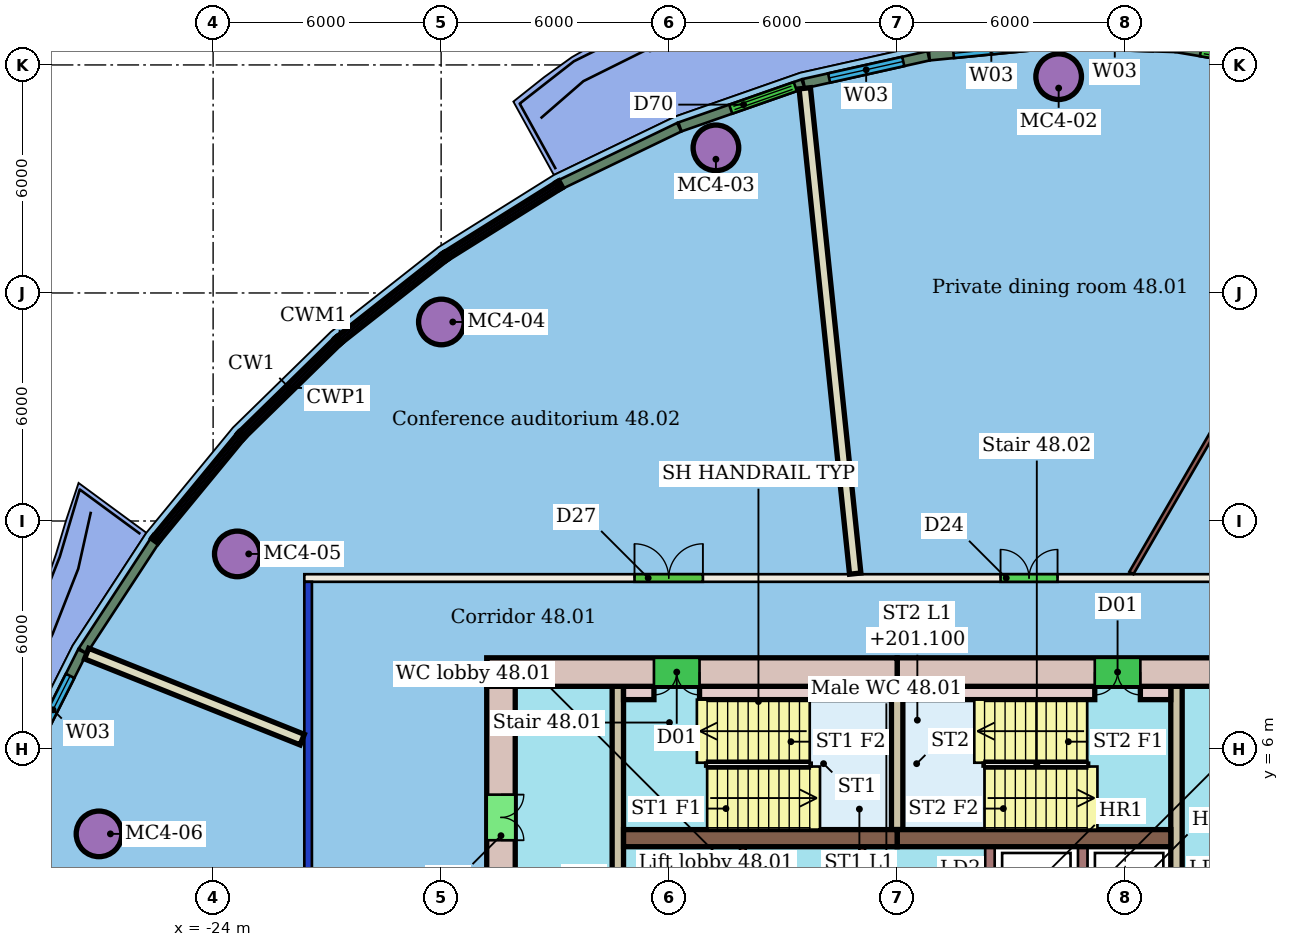
"""IFC4 building model, lengths in metres.
Left out: names, types, materials, properties, quantities, classifications, styles, units other than length and angle.
Written with IfcOpenShell. Run it as: python <this file> out.ifc"""

import sys

from ifc_helpers import new_model, si_unit, direction, frame, frame_2d, origin, origin_2d, place, context, subcontext, project, spatial, rectangle, hollow_circle, extrude, element, fill, save


model = new_model("IFC4")
c1 = context("Model", 3, precision=1e-05, world=origin(), true_north=direction((0.0, 1.0)))
c2 = subcontext(c1, "Body", "Model", "MODEL_VIEW")
j1 = project(units=[si_unit("LENGTHUNIT", "METRE"), si_unit("PLANEANGLEUNIT", "RADIAN")], contexts=[c1])
p1 = place(None, origin())
s1 = spatial("IfcSite", under=j1, at=p1, CompositionType="ELEMENT")
p2 = place(p1, origin())
s2 = spatial("IfcBuilding", under=s1, at=p2, CompositionType="ELEMENT")
p3 = place(p2, frame((0.0, 0.0, 199.3)))
s3 = spatial("IfcBuildingStorey", under=s2, at=p3, CompositionType="ELEMENT", Elevation=199.3)
for number, where, z_axis, x_axis in (
    (1, (-1.75, 23.691, 0.0), (0.0, 0.0, 1.0), (1.0, 0.0, 0.0)),
    (2, (-10.769, 21.819, 0.0), (0.0, 0.0, 1.0), (1.0, 0.0, 0.0)),
    (3, (-17.993, 17.237, 0.0), (0.0, 0.0, 1.0), (1.0, 0.0, 0.0)),
    (4, (-23.363, 11.134, 0.0), (0.0, 0.0, 1.0), (1.0, 0.0, 0.0)),
    (5, (-27.003, 3.768, 0.0), (0.0, 0.0, 1.0), (1.0, 0.0, 0.0)),
):
    element("IfcColumn", number, at=place(p3, frame(where, z_axis=z_axis, x_axis=x_axis)), inside=s3, PredefinedType="COLUMN", context=c2, shape_type="SweptSolid", body=[
        extrude(hollow_circle(Radius=0.6, WallThickness=0.045, at=origin_2d()), origin(), (0.0, 0.0, 1.0), 3.45),
    ])
p4 = place(p3, frame((-21.5, -10.4, 0.0), z_axis=(0.0, 0.0, 1.0), x_axis=(0.0, 1.0, 0.0)))
e6 = element("IfcWall", 6, at=p4, inside=s3, PredefinedType="PARTITIONING", context=c2, shape_type="SweptSolid", body=[
    extrude(rectangle(XDim=20.8, YDim=0.2, at=frame_2d((10.4, 0.0))), origin(), (0.0, 0.0, 1.0), 3.05),
])
p5 = place(p4, frame((10.705, 0.0, 0.0)))
e7 = element("IfcOpeningElement", 7, at=p5, cuts=e6, PredefinedType="OPENING", context=c2, shape_type="SweptSolid", body=[
    extrude(rectangle(XDim=1.8, YDim=2.4, at=frame_2d((0.9, 1.2))), frame((0.0, 0.11, 0.0), z_axis=(0.0, -1.0, 0.0), x_axis=(1.0, 0.0, 0.0)), (0.0, 0.0, 1.0), 0.22),
])
p6 = place(p3, frame((-21.6, 10.5, 0.0), z_axis=(0.0, 0.0, 1.0), x_axis=(1.0, 0.0, 0.0)))
e8 = element("IfcWall", 8, at=p6, inside=s3, PredefinedType="PARTITIONING", context=c2, shape_type="SweptSolid", body=[
    extrude(rectangle(XDim=31.2, YDim=0.2, at=frame_2d((15.6, 0.0))), origin(), (0.0, 0.0, 1.0), 3.45),
])
p7 = place(p6, frame((18.321, 0.0, 0.0)))
e9 = element("IfcOpeningElement", 9, at=p7, cuts=e8, PredefinedType="OPENING", context=c2, shape_type="SweptSolid", body=[
    extrude(rectangle(XDim=1.5, YDim=2.1, at=frame_2d((0.75, 1.05))), frame((0.0, 0.11, 0.0), z_axis=(0.0, -1.0, 0.0), x_axis=(1.0, 0.0, 0.0)), (0.0, 0.0, 1.0), 0.22),
])
p8 = place(p6, frame((8.688, 0.0, 0.0)))
e10 = element("IfcOpeningElement", 10, at=p8, cuts=e8, PredefinedType="OPENING", context=c2, shape_type="SweptSolid", body=[
    extrude(rectangle(XDim=1.8, YDim=2.4, at=frame_2d((0.9, 1.2))), frame((0.0, 0.11, 0.0), z_axis=(0.0, -1.0, 0.0), x_axis=(1.0, 0.0, 0.0)), (0.0, 0.0, 1.0), 0.22),
])
p9 = place(p6, frame((24.241, 0.0, 0.0)))
e11 = element("IfcOpeningElement", 11, at=p9, cuts=e8, PredefinedType="OPENING", context=c2, shape_type="SweptSolid", body=[
    extrude(rectangle(XDim=1.8, YDim=2.1, at=frame_2d((0.9, 1.05))), frame((0.0, 0.11, 0.0), z_axis=(0.0, -1.0, 0.0), x_axis=(1.0, 0.0, 0.0)), (0.0, 0.0, 1.0), 0.22),
])
p10 = place(p3, frame((7.277, 22.904, 0.0), z_axis=(0.0, 0.0, 1.0), x_axis=(-0.501519234172, -0.865146494968, 0.0)))
e12 = element("IfcWall", 12, at=p10, inside=s3, PredefinedType="PARTITIONING", context=c2, shape_type="SweptSolid", body=[
    extrude(rectangle(XDim=14.185, YDim=0.125, at=frame_2d((7.093, 0.0))), origin(), (0.0, 0.0, 1.0), 3.45),
])
p11 = place(p3, frame((-8.431, 23.386, 0.0), z_axis=(0.0, 0.0, 1.0), x_axis=(0.103405820215, -0.994639249349, 0.0)))
e13 = element("IfcWall", 13, at=p11, inside=s3, PredefinedType="PARTITIONING", context=c2, shape_type="SweptSolid", body=[
    extrude(rectangle(XDim=12.839, YDim=0.3, at=frame_2d((6.419, 0.0))), origin(), (0.0, 0.0, 1.0), 3.45),
])
p12 = place(p3, frame((-27.328, 8.511, 0.0), z_axis=(0.0, 0.0, 1.0), x_axis=(0.928768643744, -0.370659960608, 0.0)))
e14 = element("IfcWall", 14, at=p12, inside=s3, PredefinedType="PARTITIONING", context=c2, shape_type="SweptSolid", body=[
    extrude(rectangle(XDim=6.107, YDim=0.3, at=frame_2d((3.054, 0.0))), origin(), (0.0, 0.0, 1.0), 3.45),
])
p13 = place(p3, frame((4.406, 23.948, 0.0), z_axis=(0.0, 0.0, 1.0), x_axis=(-0.986216863641, 0.165457843178, 0.0)))
e15 = element("IfcWall", 15, at=p13, inside=s3, PredefinedType="SOLIDWALL", context=c2, shape_type="SweptSolid", body=[
    extrude(rectangle(XDim=3.103, YDim=0.25, at=frame_2d((1.552, 0.0))), origin(), (0.0, 0.0, 1.0), 3.1),
])
p14 = place(p13, frame((0.652, 0.0, 0.0)))
e16 = element("IfcOpeningElement", 16, at=p14, cuts=e15, PredefinedType="OPENING", context=c2, shape_type="SweptSolid", body=[
    extrude(rectangle(XDim=1.8, YDim=2.4, at=frame_2d((0.9, 1.2))), frame((0.0, 0.135, 0.0), z_axis=(0.0, -1.0, 0.0), x_axis=(1.0, 0.0, 0.0)), (0.0, 0.0, 1.0), 0.27),
])
p15 = place(p3, frame((-1.891, 24.562, 0.0), z_axis=(0.0, 0.0, 1.0), x_axis=(-0.995263213441, -0.097216953109, 0.0)))
e17 = element("IfcWall", 17, at=p15, inside=s3, PredefinedType="SOLIDWALL", context=c2, shape_type="SweptSolid", body=[
    extrude(rectangle(XDim=3.277, YDim=0.25, at=frame_2d((1.639, 0.0))), origin(), (0.0, 0.0, 1.0), 3.1),
])
p16 = place(p15, frame((0.639, 0.0, 0.9)))
e18 = element("IfcOpeningElement", 18, at=p16, cuts=e17, PredefinedType="OPENING", context=c2, shape_type="SweptSolid", body=[
    extrude(rectangle(XDim=2.0, YDim=2.1, at=frame_2d((1.0, 1.05))), frame((0.0, 0.135, 0.0), z_axis=(0.0, -1.0, 0.0), x_axis=(1.0, 0.0, 0.0)), (0.0, 0.0, 1.0), 0.27),
])
p17 = place(p3, frame((-5.176, 24.24, 0.0), z_axis=(0.0, 0.0, 1.0), x_axis=(-0.976008895139, -0.217730651514, 0.0)))
e19 = element("IfcWall", 19, at=p17, inside=s3, PredefinedType="SOLIDWALL", context=c2, shape_type="SweptSolid", body=[
    extrude(rectangle(XDim=3.359, YDim=0.25, at=frame_2d((1.68, 0.0))), origin(), (0.0, 0.0, 1.0), 3.1),
])
p18 = place(p17, frame((0.68, 0.0, 0.9)))
e20 = element("IfcOpeningElement", 20, at=p18, cuts=e19, PredefinedType="OPENING", context=c2, shape_type="SweptSolid", body=[
    extrude(rectangle(XDim=2.0, YDim=2.1, at=frame_2d((1.0, 1.05))), frame((0.0, 0.135, 0.0), z_axis=(0.0, -1.0, 0.0), x_axis=(1.0, 0.0, 0.0)), (0.0, 0.0, 1.0), 0.27),
])
p19 = place(p3, frame((-8.477, 23.502, 0.0), z_axis=(0.0, 0.0, 1.0), x_axis=(-0.943927112693, -0.330153912475, 0.0)))
e21 = element("IfcWall", 21, at=p19, inside=s3, PredefinedType="SOLIDWALL", context=c2, shape_type="SweptSolid", body=[
    extrude(rectangle(XDim=3.431, YDim=0.25, at=frame_2d((1.716, 0.0))), origin(), (0.0, 0.0, 1.0), 3.1),
])
p20 = place(p19, frame((0.216, 0.0, 0.0)))
e22 = element("IfcOpeningElement", 22, at=p20, cuts=e21, PredefinedType="OPENING", context=c2, shape_type="SweptSolid", body=[
    extrude(rectangle(XDim=1.8, YDim=2.4, at=frame_2d((0.9, 1.2))), frame((0.0, 0.135, 0.0), z_axis=(0.0, -1.0, 0.0), x_axis=(1.0, 0.0, 0.0)), (0.0, 0.0, 1.0), 0.27),
])
for number, where, z_axis, x_axis in (
    (23, (-11.736, 22.361, 0.0), (0.0, 0.0, 1.0), (-0.901, -0.434, 0.0)),
    (24, (-25.545, 11.466, 0.0), (0.0, 0.0, 1.0), (-0.547, -0.837, 0.0)),
):
    element("IfcWall", number, at=place(p3, frame(where, z_axis=z_axis, x_axis=x_axis)), inside=s3, PredefinedType="SOLIDWALL", context=c2, shape_type="SweptSolid", body=[
        extrude(rectangle(XDim=3.445, YDim=0.25, at=frame_2d((1.722, 0.0))), origin(), (0.0, 0.0, 1.0), 3.1),
    ])
p21 = place(p3, frame((-27.441, 8.564, 0.0), z_axis=(0.0, 0.0, 1.0), x_axis=(-0.449602668961, -0.89322866057, 0.0)))
e25 = element("IfcWall", 25, at=p21, inside=s3, PredefinedType="SOLIDWALL", context=c2, shape_type="SweptSolid", body=[
    extrude(rectangle(XDim=3.431, YDim=0.25, at=frame_2d((1.716, 0.0))), origin(), (0.0, 0.0, 1.0), 3.1),
])
p22 = place(p21, frame((0.716, 0.0, 0.9)))
e26 = element("IfcOpeningElement", 26, at=p22, cuts=e25, PredefinedType="OPENING", context=c2, shape_type="SweptSolid", body=[
    extrude(rectangle(XDim=2.0, YDim=2.1, at=frame_2d((1.0, 1.05))), frame((0.0, 0.135, 0.0), z_axis=(0.0, -1.0, 0.0), x_axis=(1.0, 0.0, 0.0)), (0.0, 0.0, 1.0), 0.27),
])
p23 = place(p3, frame((4.8, 8.025, 0.0), z_axis=(0.0, 0.0, 1.0), x_axis=(-1.0, 0.0, 0.0)))
e27 = element("IfcWall", 27, at=p23, inside=s3, PredefinedType="SHEAR", context=c2, shape_type="SweptSolid", body=[
    extrude(rectangle(XDim=10.8, YDim=0.75, at=frame_2d((5.4, 0.0))), origin(), (0.0, 0.0, 1.0), 3.3),
])
p24 = place(p23, frame((4.4, 0.0, 0.0)))
e28 = element("IfcOpeningElement", 28, at=p24, cuts=e27, PredefinedType="OPENING", context=c2, shape_type="SweptSolid", body=[
    extrude(rectangle(XDim=1.2, YDim=2.1, at=frame_2d((0.6, 1.05))), frame((0.0, 0.385, 0.0), z_axis=(0.0, -1.0, 0.0), x_axis=(1.0, 0.0, 0.0)), (0.0, 0.0, 1.0), 0.77),
])
p25 = place(p3, frame((-6.0, 8.025, 0.0), z_axis=(0.0, 0.0, 1.0), x_axis=(-1.0, 0.0, 0.0)))
e29 = element("IfcWall", 29, at=p25, inside=s3, PredefinedType="SHEAR", context=c2, shape_type="SweptSolid", body=[
    extrude(rectangle(XDim=10.8, YDim=0.75, at=frame_2d((5.4, 0.0))), origin(), (0.0, 0.0, 1.0), 3.3),
])
p26 = place(p25, frame((5.2, 0.0, 0.0)))
e30 = element("IfcOpeningElement", 30, at=p26, cuts=e29, PredefinedType="OPENING", context=c2, shape_type="SweptSolid", body=[
    extrude(rectangle(XDim=1.2, YDim=2.1, at=frame_2d((0.6, 1.05))), frame((0.0, 0.385, 0.0), z_axis=(0.0, -1.0, 0.0), x_axis=(1.0, 0.0, 0.0)), (0.0, 0.0, 1.0), 0.77),
])
p27 = place(p3, frame((-16.425, 7.65, 0.0), z_axis=(0.0, 0.0, 1.0), x_axis=(0.0, -1.0, 0.0)))
e31 = element("IfcWall", 31, at=p27, inside=s3, PredefinedType="SHEAR", context=c2, shape_type="SweptSolid", body=[
    extrude(rectangle(XDim=15.3, YDim=0.75, at=frame_2d((7.65, 0.0))), origin(), (0.0, 0.0, 1.0), 3.3),
])
p28 = place(p27, frame((11.25, 0.0, 0.0)))
e32 = element("IfcOpeningElement", 32, at=p28, cuts=e31, PredefinedType="OPENING", context=c2, shape_type="SweptSolid", body=[
    extrude(rectangle(XDim=1.2, YDim=2.1, at=frame_2d((0.6, 1.05))), frame((0.0, 0.385, 0.0), z_axis=(0.0, -1.0, 0.0), x_axis=(1.0, 0.0, 0.0)), (0.0, 0.0, 1.0), 0.77),
])
p29 = place(p27, frame((2.85, 0.0, 0.0)))
e33 = element("IfcOpeningElement", 33, at=p29, cuts=e31, PredefinedType="OPENING", context=c2, shape_type="SweptSolid", body=[
    extrude(rectangle(XDim=1.2, YDim=2.1, at=frame_2d((0.6, 1.05))), frame((0.0, 0.385, 0.0), z_axis=(0.0, -1.0, 0.0), x_axis=(1.0, 0.0, 0.0)), (0.0, 0.0, 1.0), 0.77),
])
for number, where, z_axis, x_axis in (
    (34, (-13.2, 3.655, 0.0), (0.0, 0.0, 1.0), (1.0, 0.0, 0.0)),
    (35, (-6.0, 3.655, 0.0), (0.0, 0.0, 1.0), (1.0, 0.0, 0.0)),
):
    element("IfcWall", number, at=place(p3, frame(where, z_axis=z_axis, x_axis=x_axis)), inside=s3, PredefinedType="SHEAR", context=c2, shape_type="SweptSolid", body=[
        extrude(rectangle(XDim=7.2, YDim=0.45, at=frame_2d((3.6, 0.0))), origin(), (0.0, 0.0, 1.0), 3.3),
    ])
p30 = place(p3, frame((-13.35, 7.65, 0.0), z_axis=(0.0, 0.0, 1.0), x_axis=(0.0, -1.0, 0.0)))
e36 = element("IfcWall", 36, at=p30, inside=s3, PredefinedType="SHEAR", context=c2, shape_type="SweptSolid", body=[
    extrude(rectangle(XDim=15.3, YDim=0.3, at=frame_2d((7.65, 0.0))), origin(), (0.0, 0.0, 1.0), 3.3),
])
p31 = place(p30, frame((6.9, 0.0, 0.0)))
e37 = element("IfcOpeningElement", 37, at=p31, cuts=e36, PredefinedType="OPENING", context=c2, shape_type="SweptSolid", body=[
    extrude(rectangle(XDim=1.5, YDim=2.1, at=frame_2d((0.75, 1.05))), frame((0.0, 0.16, 0.0), z_axis=(0.0, -1.0, 0.0), x_axis=(1.0, 0.0, 0.0)), (0.0, 0.0, 1.0), 0.32),
])
p32 = place(p3, frame((1.35, -7.65, 0.0), z_axis=(0.0, 0.0, 1.0), x_axis=(0.0, 1.0, 0.0)))
e38 = element("IfcWall", 38, at=p32, inside=s3, PredefinedType="SHEAR", context=c2, shape_type="SweptSolid", body=[
    extrude(rectangle(XDim=15.3, YDim=0.3, at=frame_2d((7.65, 0.0))), origin(), (0.0, 0.0, 1.0), 3.3),
])
p33 = place(p32, frame((1.56, 0.0, 0.0)))
e39 = element("IfcOpeningElement", 39, at=p33, cuts=e38, PredefinedType="OPENING", context=c2, shape_type="SweptSolid", body=[
    extrude(rectangle(XDim=1.0, YDim=2.1, at=frame_2d((0.5, 1.05))), frame((0.0, 0.16, 0.0), z_axis=(0.0, -1.0, 0.0), x_axis=(1.0, 0.0, 0.0)), (0.0, 0.0, 1.0), 0.32),
])
p34 = place(p32, frame((6.9, 0.0, 0.0)))
e40 = element("IfcOpeningElement", 40, at=p34, cuts=e38, PredefinedType="OPENING", context=c2, shape_type="SweptSolid", body=[
    extrude(rectangle(XDim=1.5, YDim=2.1, at=frame_2d((0.75, 1.05))), frame((0.0, 0.16, 0.0), z_axis=(0.0, -1.0, 0.0), x_axis=(1.0, 0.0, 0.0)), (0.0, 0.0, 1.0), 0.32),
])
p35 = place(p3, frame((-6.0, 3.88, 0.0), z_axis=(0.0, 0.0, 1.0), x_axis=(0.0, 1.0, 0.0)))
e41 = element("IfcWall", 41, at=p35, inside=s3, PredefinedType="SHEAR", context=c2, shape_type="SweptSolid", body=[
    extrude(rectangle(XDim=3.77, YDim=0.3, at=frame_2d((1.885, 0.0))), origin(), (0.0, 0.0, 1.0), 3.3),
])
p36 = place(p3, frame((-13.2, 7.475, 0.0), z_axis=(0.0, 0.0, 1.0), x_axis=(1.0, 0.0, 0.0)))
e42 = element("IfcWall", 42, at=p36, inside=s3, PredefinedType="SHEAR", context=c2, shape_type="SweptSolid", body=[
    extrude(rectangle(XDim=0.8, YDim=0.35, at=frame_2d((0.4, 0.0))), origin(), (0.0, 0.0, 1.0), 3.3),
])
for number, where, z_axis, x_axis in (
    (43, (-11.2, 7.475, 0.0), (0.0, 0.0, 1.0), (1.0, 0.0, 0.0)),
    (44, (-5.85, 7.475, 0.0), (0.0, 0.0, 1.0), (1.0, 0.0, 0.0)),
):
    element("IfcWall", number, at=place(p3, frame(where, z_axis=z_axis, x_axis=x_axis)), inside=s3, PredefinedType="SHEAR", context=c2, shape_type="SweptSolid", body=[
        extrude(rectangle(XDim=5.05, YDim=0.35, at=frame_2d((2.525, 0.0))), origin(), (0.0, 0.0, 1.0), 3.3),
    ])
p37 = place(p3, frame((0.4, 7.475, 0.0), z_axis=(0.0, 0.0, 1.0), x_axis=(1.0, 0.0, 0.0)))
e45 = element("IfcWall", 45, at=p37, inside=s3, PredefinedType="SHEAR", context=c2, shape_type="SweptSolid", body=[
    extrude(rectangle(XDim=0.8, YDim=0.35, at=frame_2d((0.4, 0.0))), origin(), (0.0, 0.0, 1.0), 3.3),
])
for number, where, z_axis, x_axis in (
    (46, (-3.558, 1.6, 0.0), (0.0, 0.0, 1.0), (0.0, 1.0, 0.0)),
    (47, (-1.117, 1.6, 0.0), (0.0, 0.0, 1.0), (0.0, 1.0, 0.0)),
):
    element("IfcWall", number, at=place(p3, frame(where, z_axis=z_axis, x_axis=x_axis)), inside=s3, PredefinedType="SHEAR", context=c2, shape_type="SweptSolid", body=[
        extrude(rectangle(XDim=1.83, YDim=0.25, at=frame_2d((0.915, 0.0))), origin(), (0.0, 0.0, 1.0), 3.3),
    ])
for number, where, z_axis, x_axis in (
    (48, (-10.06, 1.6, 0.0), (0.0, 0.0, 1.0), (0.0, 1.0, 0.0)),
    (49, (-6.919, 1.6, 0.0), (0.0, 0.0, 1.0), (0.0, 1.0, 0.0)),
):
    element("IfcWall", number, at=place(p3, frame(where, z_axis=z_axis, x_axis=x_axis)), inside=s3, PredefinedType="PARTITIONING", context=c2, shape_type="SweptSolid", body=[
        extrude(rectangle(XDim=1.83, YDim=0.15, at=frame_2d((0.915, 0.0))), origin(), (0.0, 0.0, 1.0), 3.3),
    ])
p38 = place(p7, origin())
e50 = element("IfcDoor", 50, at=p38, inside=s3, OperationType="DOUBLE_DOOR_SINGLE_SWING", PredefinedType="DOOR", context=c2, shape_type="SweptSolid", body=[
    extrude(rectangle(XDim=1.5, YDim=2.1, at=frame_2d((0.75, 1.05))), frame((0.0, 0.025, 0.0), z_axis=(0.0, -1.0, 0.0), x_axis=(1.0, 0.0, 0.0)), (0.0, 0.0, 1.0), 0.05),
])
fill(e9, e50)
p39 = place(p8, origin())
e51 = element("IfcDoor", 51, at=p39, inside=s3, OperationType="DOUBLE_DOOR_SINGLE_SWING", PredefinedType="DOOR", context=c2, shape_type="SweptSolid", body=[
    extrude(rectangle(XDim=1.8, YDim=2.4, at=frame_2d((0.9, 1.2))), frame((0.0, 0.025, 0.0), z_axis=(0.0, -1.0, 0.0), x_axis=(1.0, 0.0, 0.0)), (0.0, 0.0, 1.0), 0.05),
])
fill(e10, e51)
p40 = place(p14, origin())
e52 = element("IfcDoor", 52, at=p40, inside=s3, OperationType="DOUBLE_DOOR_SLIDING", PredefinedType="DOOR", context=c2, shape_type="SweptSolid", body=[
    extrude(rectangle(XDim=1.8, YDim=2.4, at=frame_2d((0.9, 1.2))), frame((0.0, 0.025, 0.0), z_axis=(0.0, -1.0, 0.0), x_axis=(1.0, 0.0, 0.0)), (0.0, 0.0, 1.0), 0.05),
])
fill(e16, e52)
p41 = place(p16, origin())
e53 = element("IfcWindow", 53, at=p41, inside=s3, PartitioningType="SINGLE_PANEL", PredefinedType="WINDOW", context=c2, shape_type="SweptSolid", body=[
    extrude(rectangle(XDim=2.0, YDim=2.1, at=frame_2d((1.0, 1.05))), frame((0.0, 0.03, 0.0), z_axis=(0.0, -1.0, 0.0), x_axis=(1.0, 0.0, 0.0)), (0.0, 0.0, 1.0), 0.06),
])
fill(e18, e53)
p42 = place(p18, origin())
e54 = element("IfcWindow", 54, at=p42, inside=s3, PartitioningType="SINGLE_PANEL", PredefinedType="WINDOW", context=c2, shape_type="SweptSolid", body=[
    extrude(rectangle(XDim=2.0, YDim=2.1, at=frame_2d((1.0, 1.05))), frame((0.0, 0.03, 0.0), z_axis=(0.0, -1.0, 0.0), x_axis=(1.0, 0.0, 0.0)), (0.0, 0.0, 1.0), 0.06),
])
fill(e20, e54)
p43 = place(p20, origin())
e55 = element("IfcDoor", 55, at=p43, inside=s3, OperationType="DOUBLE_DOOR_SLIDING", PredefinedType="DOOR", context=c2, shape_type="SweptSolid", body=[
    extrude(rectangle(XDim=1.8, YDim=2.4, at=frame_2d((0.9, 1.2))), frame((0.0, 0.025, 0.0), z_axis=(0.0, -1.0, 0.0), x_axis=(1.0, 0.0, 0.0)), (0.0, 0.0, 1.0), 0.05),
])
fill(e22, e55)
p44 = place(p22, origin())
e56 = element("IfcWindow", 56, at=p44, inside=s3, PartitioningType="SINGLE_PANEL", PredefinedType="WINDOW", context=c2, shape_type="SweptSolid", body=[
    extrude(rectangle(XDim=2.0, YDim=2.1, at=frame_2d((1.0, 1.05))), frame((0.0, 0.03, 0.0), z_axis=(0.0, -1.0, 0.0), x_axis=(1.0, 0.0, 0.0)), (0.0, 0.0, 1.0), 0.06),
])
fill(e26, e56)
p45 = place(p24, origin())
e57 = element("IfcDoor", 57, at=p45, inside=s3, OperationType="DOUBLE_DOOR_SINGLE_SWING", PredefinedType="NOTDEFINED", context=c2, shape_type="SweptSolid", body=[
    extrude(rectangle(XDim=1.2, YDim=2.1, at=frame_2d((0.6, 1.05))), frame((0.0, 0.025, 0.0), z_axis=(0.0, -1.0, 0.0), x_axis=(1.0, 0.0, 0.0)), (0.0, 0.0, 1.0), 0.05),
])
fill(e28, e57)
p46 = place(p26, origin())
e58 = element("IfcDoor", 58, at=p46, inside=s3, OperationType="DOUBLE_DOOR_SINGLE_SWING", PredefinedType="NOTDEFINED", context=c2, shape_type="SweptSolid", body=[
    extrude(rectangle(XDim=1.2, YDim=2.1, at=frame_2d((0.6, 1.05))), frame((0.0, 0.025, 0.0), z_axis=(0.0, -1.0, 0.0), x_axis=(1.0, 0.0, 0.0)), (0.0, 0.0, 1.0), 0.05),
])
fill(e30, e58)
p47 = place(p29, origin())
e59 = element("IfcDoor", 59, at=p47, inside=s3, OperationType="DOUBLE_DOOR_SINGLE_SWING", PredefinedType="NOTDEFINED", context=c2, shape_type="SweptSolid", body=[
    extrude(rectangle(XDim=1.2, YDim=2.1, at=frame_2d((0.6, 1.05))), frame((0.0, 0.025, 0.0), z_axis=(0.0, -1.0, 0.0), x_axis=(1.0, 0.0, 0.0)), (0.0, 0.0, 1.0), 0.05),
])
fill(e33, e59)
save(model, sys.argv[1])
